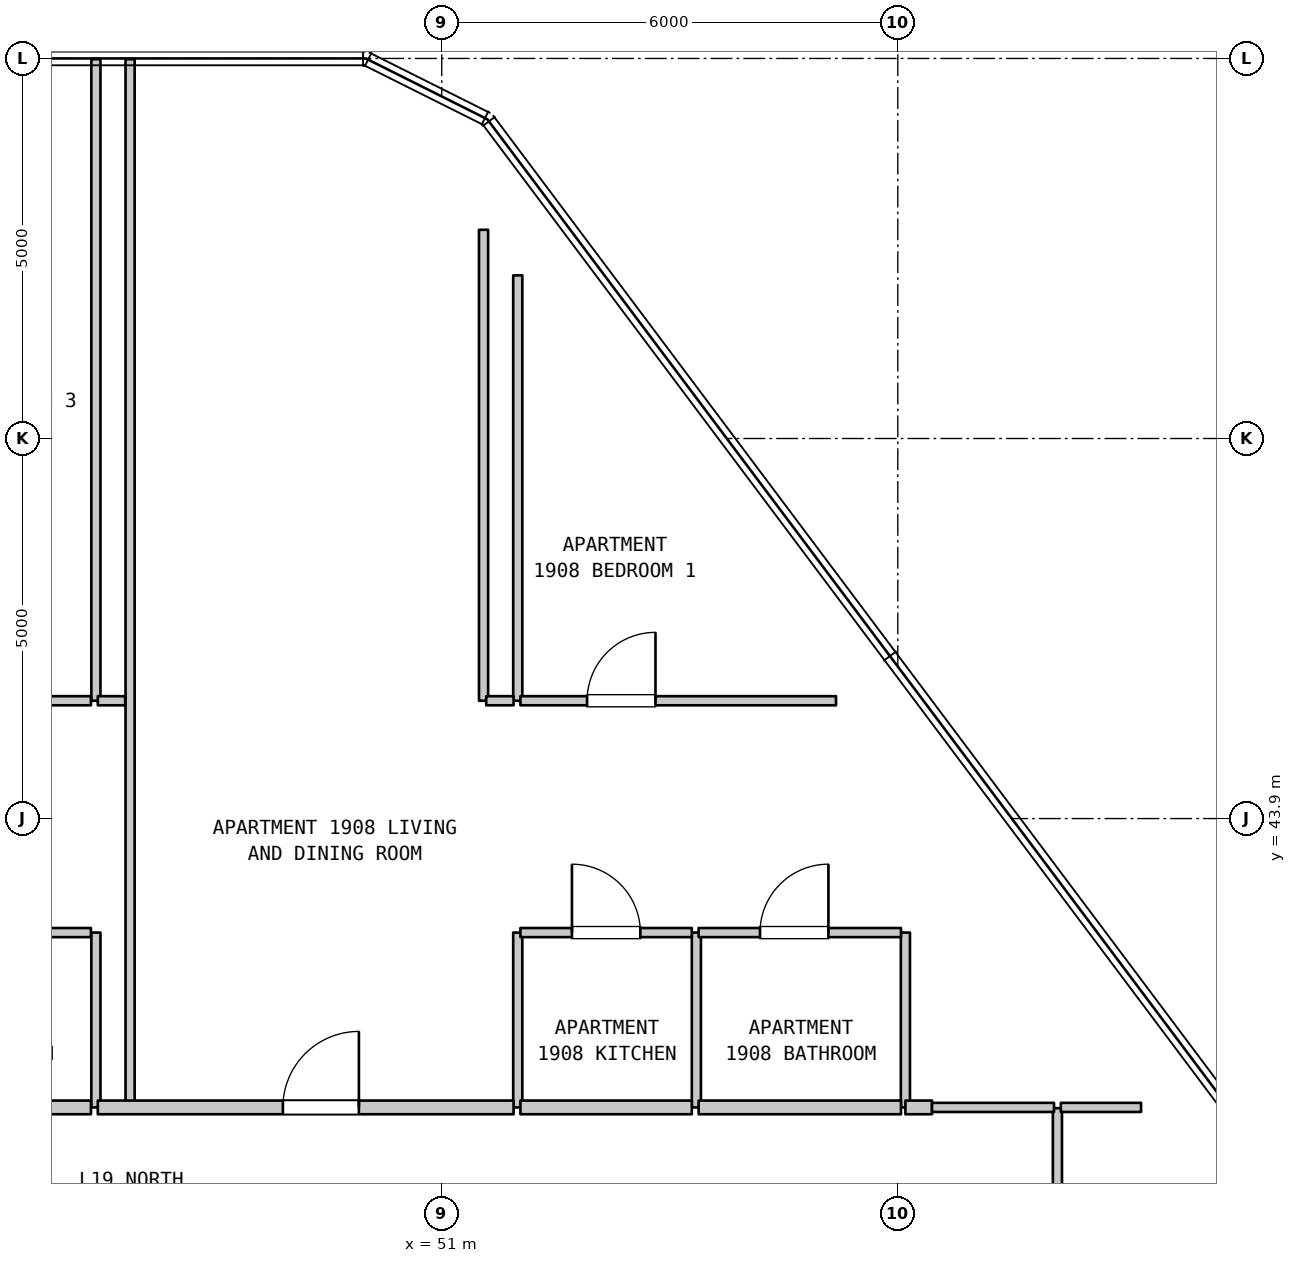
"""IFC4 building model, lengths in metres.
Left out: names, types, materials, properties, quantities, classifications, styles, units other than length and angle.
Written with IfcOpenShell. Run it as: python <this file> out.ifc"""

import sys

from ifc_helpers import new_model, si_unit, direction, frame, frame_2d, origin, place, context, subcontext, project, spatial, rectangle, extrude, element, fill, save


model = new_model("IFC4")
c1 = context("Model", 3, precision=1e-05, world=origin(), true_north=direction((0.0, 1.0)))
c2 = subcontext(c1, "Body", "Model", "MODEL_VIEW")
j1 = project(units=[si_unit("LENGTHUNIT", "METRE"), si_unit("PLANEANGLEUNIT", "RADIAN")], contexts=[c1])
p1 = place(None, origin())
s1 = spatial("IfcSite", under=j1, at=p1, CompositionType="ELEMENT")
p2 = place(p1, origin())
s2 = spatial("IfcBuilding", under=s1, at=p2, CompositionType="ELEMENT")
p3 = place(p2, frame((0.0, 0.0, 81.2)))
s3 = spatial("IfcBuildingStorey", under=s2, at=p3, CompositionType="ELEMENT", Elevation=81.2)
p4 = place(p3, frame((46.45, 40.1, 0.0), z_axis=(0.0, 0.0, 1.0), x_axis=(0.0, 1.0, 0.0)))
e1 = element("IfcWall", 1, at=p4, inside=s3, PredefinedType="PARTITIONING", context=c2, shape_type="SweptSolid", body=[
    extrude(rectangle(XDim=2.3, YDim=0.12, at=frame_2d((1.15, 0.0))), origin(), (0.0, 0.0, 1.0), 4.885),
])
p5 = place(p3, frame((46.45, 45.45, 0.0), z_axis=(0.0, 0.0, 1.0), x_axis=(0.0, 1.0, 0.0)))
e2 = element("IfcWall", 2, at=p5, inside=s3, PredefinedType="PARTITIONING", context=c2, shape_type="SweptSolid", body=[
    extrude(rectangle(XDim=8.44, YDim=0.12, at=frame_2d((4.22, 0.0))), origin(), (0.0, 0.0, 1.0), 4.885),
])
p6 = place(p3, frame((46.9, 40.1, 0.0), z_axis=(0.0, 0.0, 1.0), x_axis=(0.0, 1.0, 0.0)))
e3 = element("IfcWall", 3, at=p6, inside=s3, PredefinedType="PARTITIONING", context=c2, shape_type="SweptSolid", body=[
    extrude(rectangle(XDim=13.79, YDim=0.12, at=frame_2d((6.895, 0.0))), origin(), (0.0, 0.0, 1.0), 4.885),
])
p7 = place(p3, frame((51.55, 45.45, 0.0), z_axis=(0.0, 0.0, 1.0), x_axis=(0.0, 1.0, 0.0)))
e4 = element("IfcWall", 4, at=p7, inside=s3, PredefinedType="PARTITIONING", context=c2, shape_type="SweptSolid", body=[
    extrude(rectangle(XDim=6.196, YDim=0.12, at=frame_2d((3.098, 0.0))), origin(), (0.0, 0.0, 1.0), 4.885),
])
p8 = place(p3, frame((52.0, 40.1, 0.0), z_axis=(0.0, 0.0, 1.0), x_axis=(0.0, 1.0, 0.0)))
e5 = element("IfcWall", 5, at=p8, inside=s3, PredefinedType="PARTITIONING", context=c2, shape_type="SweptSolid", body=[
    extrude(rectangle(XDim=2.3, YDim=0.12, at=frame_2d((1.15, 0.0))), origin(), (0.0, 0.0, 1.0), 4.885),
])
p9 = place(p3, frame((52.0, 45.45, 0.0), z_axis=(0.0, 0.0, 1.0), x_axis=(0.0, 1.0, 0.0)))
e6 = element("IfcWall", 6, at=p9, inside=s3, PredefinedType="PARTITIONING", context=c2, shape_type="SweptSolid", body=[
    extrude(rectangle(XDim=5.596, YDim=0.12, at=frame_2d((2.798, 0.0))), origin(), (0.0, 0.0, 1.0), 4.885),
])
for number, where, z_axis, x_axis in (
    (7, (54.35, 40.1, 0.0), (0.0, 0.0, 1.0), (0.0, 1.0, 0.0)),
    (8, (57.1, 40.1, 0.0), (0.0, 0.0, 1.0), (0.0, 1.0, 0.0)),
):
    element("IfcWall", number, at=place(p3, frame(where, z_axis=z_axis, x_axis=x_axis)), inside=s3, PredefinedType="PARTITIONING", context=c2, shape_type="SweptSolid", body=[
        extrude(rectangle(XDim=2.3, YDim=0.12, at=frame_2d((1.15, 0.0))), origin(), (0.0, 0.0, 1.0), 4.885),
    ])
p10 = place(p3, frame((59.1, 37.89, 0.0), z_axis=(0.0, 0.0, 1.0), x_axis=(0.0, 1.0, 0.0)))
e9 = element("IfcWall", 9, at=p10, inside=s3, PredefinedType="PARTITIONING", context=c2, shape_type="SweptSolid", body=[
    extrude(rectangle(XDim=2.2, YDim=0.12, at=frame_2d((1.1, 0.0))), origin(), (0.0, 0.0, 1.0), 4.885),
])
p11 = place(p3, frame((43.551, 40.1, 0.0), z_axis=(0.0, 0.0, 1.0), x_axis=(1.0, 0.0, 0.0)))
e10 = element("IfcWall", 10, at=p11, inside=s3, PredefinedType="STANDARD", context=c2, shape_type="SweptSolid", body=[
    extrude(rectangle(XDim=2.834, YDim=0.18, at=frame_2d((1.417, 0.0))), origin(), (0.0, 0.0, 1.0), 4.885),
])
p12 = place(p3, frame((46.475, 40.1, 0.0), z_axis=(0.0, 0.0, 1.0), x_axis=(1.0, 0.0, 0.0)))
e11 = element("IfcWall", 11, at=p12, inside=s3, PredefinedType="STANDARD", context=c2, shape_type="SweptSolid", body=[
    extrude(rectangle(XDim=5.47, YDim=0.18, at=frame_2d((2.735, 0.0))), origin(), (0.0, 0.0, 1.0), 4.885),
])
p13 = place(p12, frame((2.435, 0.0, 0.0)))
e12 = element("IfcOpeningElement", 12, at=p13, cuts=e11, PredefinedType="OPENING", context=c2, shape_type="SweptSolid", body=[
    extrude(rectangle(XDim=1.0, YDim=2.15, at=frame_2d((0.5, 1.075))), frame((0.0, 0.1, 0.0), z_axis=(0.0, -1.0, 0.0), x_axis=(1.0, 0.0, 0.0)), (0.0, 0.0, 1.0), 0.2),
])
p14 = place(p3, frame((52.035, 40.1, 0.0), z_axis=(0.0, 0.0, 1.0), x_axis=(1.0, 0.0, 0.0)))
e13 = element("IfcWall", 13, at=p14, inside=s3, PredefinedType="STANDARD", context=c2, shape_type="SweptSolid", body=[
    extrude(rectangle(XDim=2.255, YDim=0.18, at=frame_2d((1.127, 0.0))), origin(), (0.0, 0.0, 1.0), 4.885),
])
p15 = place(p3, frame((54.38, 40.1, 0.0), z_axis=(0.0, 0.0, 1.0), x_axis=(1.0, 0.0, 0.0)))
e14 = element("IfcWall", 14, at=p15, inside=s3, PredefinedType="STANDARD", context=c2, shape_type="SweptSolid", body=[
    extrude(rectangle(XDim=2.662, YDim=0.18, at=frame_2d((1.331, 0.0))), origin(), (0.0, 0.0, 1.0), 4.885),
])
p16 = place(p3, frame((57.1, 40.1, 0.0), z_axis=(0.0, 0.0, 1.0), x_axis=(1.0, 0.0, 0.0)))
e15 = element("IfcWall", 15, at=p16, inside=s3, PredefinedType="STANDARD", context=c2, shape_type="SweptSolid", body=[
    extrude(rectangle(XDim=0.35, YDim=0.18, at=frame_2d((0.175, 0.0))), origin(), (0.0, 0.0, 1.0), 4.885),
])
p17 = place(p3, frame((57.45, 40.1, 0.0), z_axis=(0.0, 0.0, 1.0), x_axis=(1.0, 0.0, 0.0)))
e16 = element("IfcWall", 16, at=p17, inside=s3, PredefinedType="PARTITIONING", context=c2, shape_type="SweptSolid", body=[
    extrude(rectangle(XDim=1.605, YDim=0.12, at=frame_2d((0.802, 0.0))), origin(), (0.0, 0.0, 1.0), 4.885),
])
p18 = place(p3, frame((59.145, 40.1, 0.0), z_axis=(0.0, 0.0, 1.0), x_axis=(1.0, 0.0, 0.0)))
e17 = element("IfcWall", 17, at=p18, inside=s3, PredefinedType="PARTITIONING", context=c2, shape_type="SweptSolid", body=[
    extrude(rectangle(XDim=1.055, YDim=0.12, at=frame_2d((0.527, 0.0))), origin(), (0.0, 0.0, 1.0), 4.885),
])
p19 = place(p3, frame((43.551, 42.4, 0.0), z_axis=(0.0, 0.0, 1.0), x_axis=(1.0, 0.0, 0.0)))
e18 = element("IfcWall", 18, at=p19, inside=s3, PredefinedType="PARTITIONING", context=c2, shape_type="SweptSolid", body=[
    extrude(rectangle(XDim=2.834, YDim=0.12, at=frame_2d((1.417, 0.0))), origin(), (0.0, 0.0, 1.0), 4.885),
])
p20 = place(p19, frame((0.967, 0.0, 0.0)))
e19 = element("IfcOpeningElement", 19, at=p20, cuts=e18, PredefinedType="OPENING", context=c2, shape_type="SweptSolid", body=[
    extrude(rectangle(XDim=0.9, YDim=2.15, at=frame_2d((0.45, 1.075))), frame((0.0, 0.07, 0.0), z_axis=(0.0, -1.0, 0.0), x_axis=(1.0, 0.0, 0.0)), (0.0, 0.0, 1.0), 0.14),
])
p21 = place(p3, frame((52.035, 42.4, 0.0), z_axis=(0.0, 0.0, 1.0), x_axis=(1.0, 0.0, 0.0)))
e20 = element("IfcWall", 20, at=p21, inside=s3, PredefinedType="PARTITIONING", context=c2, shape_type="SweptSolid", body=[
    extrude(rectangle(XDim=2.255, YDim=0.12, at=frame_2d((1.127, 0.0))), origin(), (0.0, 0.0, 1.0), 4.885),
])
p22 = place(p21, frame((0.678, 0.0, 0.0)))
e21 = element("IfcOpeningElement", 21, at=p22, cuts=e20, PredefinedType="OPENING", context=c2, shape_type="SweptSolid", body=[
    extrude(rectangle(XDim=0.9, YDim=2.15, at=frame_2d((0.45, 1.075))), frame((0.0, 0.07, 0.0), z_axis=(0.0, -1.0, 0.0), x_axis=(1.0, 0.0, 0.0)), (0.0, 0.0, 1.0), 0.14),
])
p23 = place(p3, frame((54.38, 42.4, 0.0), z_axis=(0.0, 0.0, 1.0), x_axis=(1.0, 0.0, 0.0)))
e22 = element("IfcWall", 22, at=p23, inside=s3, PredefinedType="PARTITIONING", context=c2, shape_type="SweptSolid", body=[
    extrude(rectangle(XDim=2.662, YDim=0.12, at=frame_2d((1.331, 0.0))), origin(), (0.0, 0.0, 1.0), 4.885),
])
p24 = place(p23, frame((0.807, 0.0, 0.0)))
e23 = element("IfcOpeningElement", 23, at=p24, cuts=e22, PredefinedType="OPENING", context=c2, shape_type="SweptSolid", body=[
    extrude(rectangle(XDim=0.9, YDim=2.1, at=frame_2d((0.45, 1.05))), frame((0.0, 0.07, 0.0), z_axis=(0.0, -1.0, 0.0), x_axis=(1.0, 0.0, 0.0)), (0.0, 0.0, 1.0), 0.14),
])
p25 = place(p3, frame((38.655, 45.45, 0.0), z_axis=(0.0, 0.0, 1.0), x_axis=(1.0, 0.0, 0.0)))
e24 = element("IfcWall", 24, at=p25, inside=s3, PredefinedType="PARTITIONING", context=c2, shape_type="SweptSolid", body=[
    extrude(rectangle(XDim=7.73, YDim=0.12, at=frame_2d((3.865, 0.0))), origin(), (0.0, 0.0, 1.0), 4.885),
])
p26 = place(p25, frame((0.984, 0.0, 0.0)))
e25 = element("IfcOpeningElement", 25, at=p26, cuts=e24, PredefinedType="OPENING", context=c2, shape_type="SweptSolid", body=[
    extrude(rectangle(XDim=0.9, YDim=2.15, at=frame_2d((0.45, 1.075))), frame((0.0, 0.07, 0.0), z_axis=(0.0, -1.0, 0.0), x_axis=(1.0, 0.0, 0.0)), (0.0, 0.0, 1.0), 0.14),
])
p27 = place(p25, frame((3.415, 0.0, 0.0)))
e26 = element("IfcOpeningElement", 26, at=p27, cuts=e24, PredefinedType="OPENING", context=c2, shape_type="SweptSolid", body=[
    extrude(rectangle(XDim=0.9, YDim=2.15, at=frame_2d((0.45, 1.075))), frame((0.0, 0.07, 0.0), z_axis=(0.0, -1.0, 0.0), x_axis=(1.0, 0.0, 0.0)), (0.0, 0.0, 1.0), 0.14),
])
p28 = place(p25, frame((5.847, 0.0, 0.0)))
e27 = element("IfcOpeningElement", 27, at=p28, cuts=e24, PredefinedType="OPENING", context=c2, shape_type="SweptSolid", body=[
    extrude(rectangle(XDim=0.9, YDim=2.15, at=frame_2d((0.45, 1.075))), frame((0.0, 0.07, 0.0), z_axis=(0.0, -1.0, 0.0), x_axis=(1.0, 0.0, 0.0)), (0.0, 0.0, 1.0), 0.14),
])
p29 = place(p3, frame((46.475, 45.45, 0.0), z_axis=(0.0, 0.0, 1.0), x_axis=(1.0, 0.0, 0.0)))
e28 = element("IfcWall", 28, at=p29, inside=s3, PredefinedType="PARTITIONING", context=c2, shape_type="SweptSolid", body=[
    extrude(rectangle(XDim=0.36, YDim=0.12, at=frame_2d((0.18, 0.0))), origin(), (0.0, 0.0, 1.0), 4.885),
])
p30 = place(p3, frame((51.585, 45.45, 0.0), z_axis=(0.0, 0.0, 1.0), x_axis=(1.0, 0.0, 0.0)))
e29 = element("IfcWall", 29, at=p30, inside=s3, PredefinedType="PARTITIONING", context=c2, shape_type="SweptSolid", body=[
    extrude(rectangle(XDim=0.36, YDim=0.12, at=frame_2d((0.18, 0.0))), origin(), (0.0, 0.0, 1.0), 4.885),
])
p31 = place(p3, frame((52.035, 45.45, 0.0), z_axis=(0.0, 0.0, 1.0), x_axis=(1.0, 0.0, 0.0)))
e30 = element("IfcWall", 30, at=p31, inside=s3, PredefinedType="PARTITIONING", context=c2, shape_type="SweptSolid", body=[
    extrude(rectangle(XDim=4.152, YDim=0.12, at=frame_2d((2.076, 0.0))), origin(), (0.0, 0.0, 1.0), 4.885),
])
p32 = place(p31, frame((0.877, 0.0, 0.0)))
e31 = element("IfcOpeningElement", 31, at=p32, cuts=e30, PredefinedType="OPENING", context=c2, shape_type="SweptSolid", body=[
    extrude(rectangle(XDim=0.9, YDim=2.15, at=frame_2d((0.45, 1.075))), frame((0.0, 0.07, 0.0), z_axis=(0.0, -1.0, 0.0), x_axis=(1.0, 0.0, 0.0)), (0.0, 0.0, 1.0), 0.14),
])
p33 = place(p13, origin())
e32 = element("IfcDoor", 32, at=p33, inside=s3, OperationType="SINGLE_SWING_RIGHT", PredefinedType="DOOR", context=c2, shape_type="SweptSolid", body=[
    extrude(rectangle(XDim=1.0, YDim=2.15, at=frame_2d((0.5, 1.075))), frame((0.0, 0.025, 0.0), z_axis=(0.0, -1.0, 0.0), x_axis=(1.0, 0.0, 0.0)), (0.0, 0.0, 1.0), 0.05),
])
fill(e12, e32)
p34 = place(p22, origin())
e33 = element("IfcDoor", 33, at=p34, inside=s3, OperationType="SINGLE_SWING_LEFT", PredefinedType="DOOR", context=c2, shape_type="SweptSolid", body=[
    extrude(rectangle(XDim=0.9, YDim=2.15, at=frame_2d((0.45, 1.075))), frame((0.0, 0.025, 0.0), z_axis=(0.0, -1.0, 0.0), x_axis=(1.0, 0.0, 0.0)), (0.0, 0.0, 1.0), 0.05),
])
fill(e21, e33)
p35 = place(p24, origin())
e34 = element("IfcDoor", 34, at=p35, inside=s3, OperationType="SINGLE_SWING_RIGHT", PredefinedType="DOOR", context=c2, shape_type="SweptSolid", body=[
    extrude(rectangle(XDim=0.9, YDim=2.1, at=frame_2d((0.45, 1.05))), frame((0.0, 0.025, 0.0), z_axis=(0.0, -1.0, 0.0), x_axis=(1.0, 0.0, 0.0)), (0.0, 0.0, 1.0), 0.05),
])
fill(e23, e34)
p36 = place(p32, origin())
e35 = element("IfcDoor", 35, at=p36, inside=s3, OperationType="SINGLE_SWING_RIGHT", PredefinedType="DOOR", context=c2, shape_type="SweptSolid", body=[
    extrude(rectangle(XDim=0.9, YDim=2.15, at=frame_2d((0.45, 1.075))), frame((0.0, 0.025, 0.0), z_axis=(0.0, -1.0, 0.0), x_axis=(1.0, 0.0, 0.0)), (0.0, 0.0, 1.0), 0.05),
])
fill(e31, e35)
save(model, sys.argv[1])
